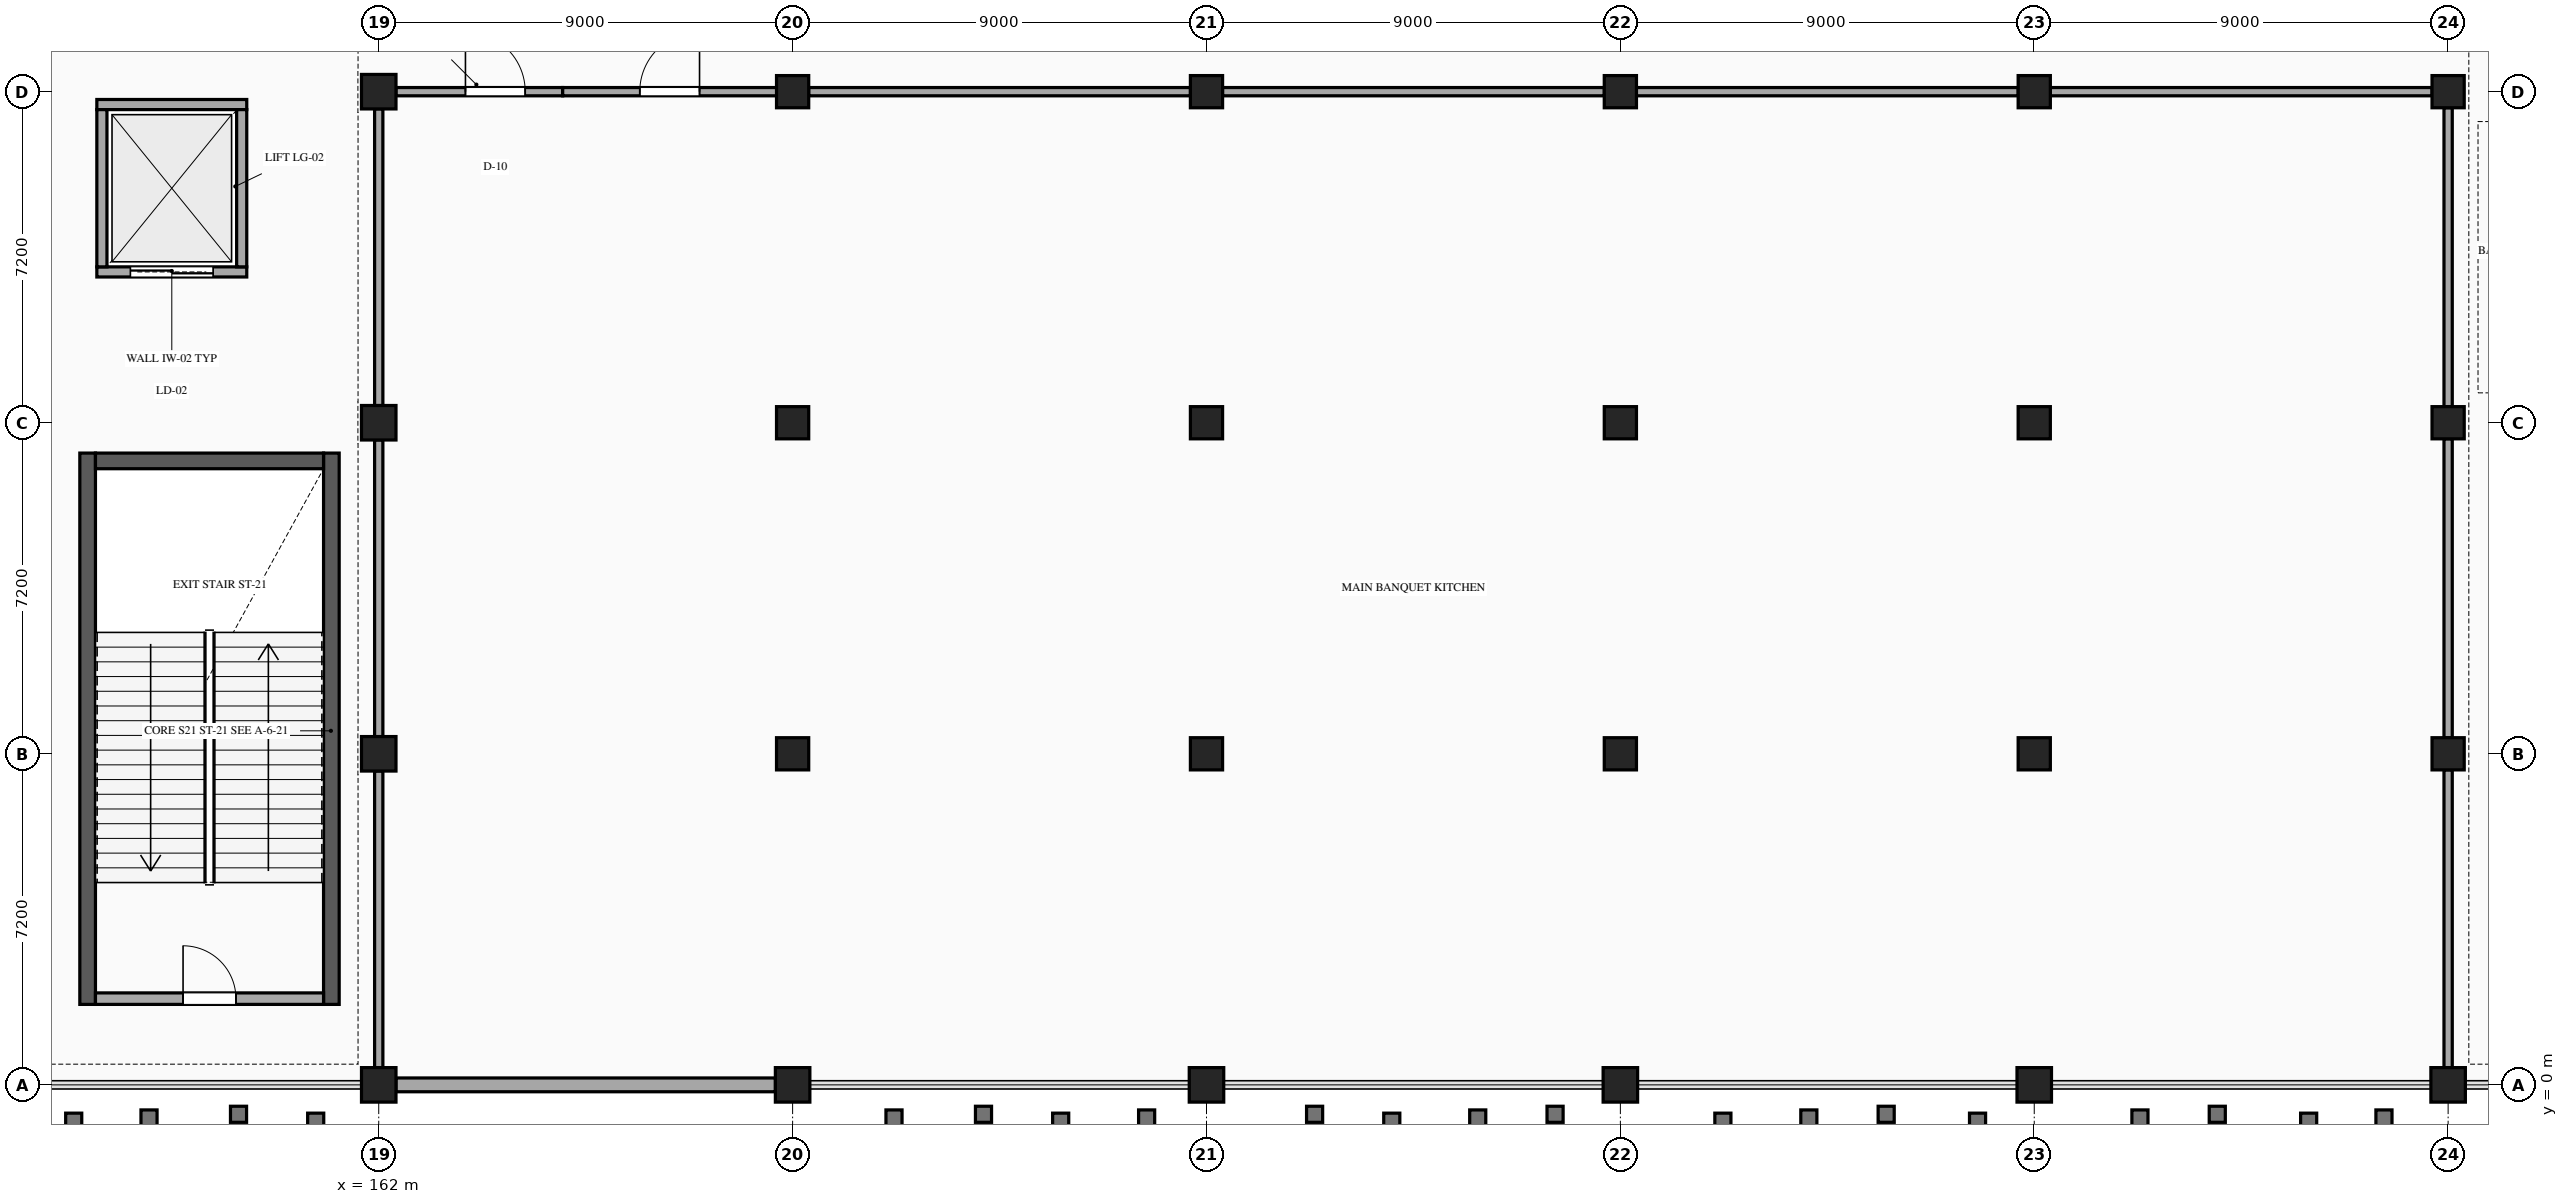
"""IFC4 building model, lengths in metres.
Left out: names, types, materials, properties, quantities, classifications, styles, units other than length and angle.
Written with IfcOpenShell. Run it as: python <this file> out.ifc"""

import sys

from ifc_helpers import new_model, si_unit, direction, frame, frame_2d, origin, origin_2d, place, context, subcontext, project, spatial, rectangle, extrude, element, fill, save


model = new_model("IFC4")
c1 = context("Model", 3, precision=1e-05, world=origin(), true_north=direction((0.0, 1.0)))
c2 = subcontext(c1, "Body", "Model", "MODEL_VIEW")
j1 = project(units=[si_unit("LENGTHUNIT", "METRE"), si_unit("PLANEANGLEUNIT", "RADIAN")], contexts=[c1])
p1 = place(None, origin())
s1 = spatial("IfcSite", under=j1, at=p1, CompositionType="ELEMENT")
p2 = place(p1, origin())
s2 = spatial("IfcBuilding", under=s1, at=p2, CompositionType="ELEMENT")
p3 = place(p2, frame((0.0, 0.0, 5.4)))
s3 = spatial("IfcBuildingStorey", under=s2, at=p3, CompositionType="ELEMENT", Elevation=5.4)
for number, where, z_axis, x_axis in (
    (1, (162.0, 0.0, 0.0), (0.0, 0.0, 1.0), (1.0, 0.0, 0.0)),
    (2, (162.0, 7.2, 0.0), (0.0, 0.0, 1.0), (1.0, 0.0, 0.0)),
    (3, (162.0, 14.4, 0.0), (0.0, 0.0, 1.0), (1.0, 0.0, 0.0)),
    (4, (162.0, 21.6, 0.0), (0.0, 0.0, 1.0), (1.0, 0.0, 0.0)),
    (5, (171.0, 0.0, 0.0), (0.0, 0.0, 1.0), (1.0, 0.0, 0.0)),
):
    element("IfcColumn", number, at=place(p3, frame(where, z_axis=z_axis, x_axis=x_axis)), inside=s3, PredefinedType="COLUMN", context=c2, shape_type="SweptSolid", body=[
        extrude(rectangle(XDim=0.75, YDim=0.75, at=origin_2d()), origin(), (0.0, 0.0, 1.0), 5.4),
    ])
for number, where, z_axis, x_axis in (
    (6, (171.0, 7.2, 0.0), (0.0, 0.0, 1.0), (1.0, 0.0, 0.0)),
    (7, (171.0, 14.4, 0.0), (0.0, 0.0, 1.0), (1.0, 0.0, 0.0)),
    (8, (171.0, 21.6, 0.0), (0.0, 0.0, 1.0), (1.0, 0.0, 0.0)),
):
    element("IfcColumn", number, at=place(p3, frame(where, z_axis=z_axis, x_axis=x_axis)), inside=s3, PredefinedType="COLUMN", context=c2, shape_type="SweptSolid", body=[
        extrude(rectangle(XDim=0.7, YDim=0.7, at=origin_2d()), origin(), (0.0, 0.0, 1.0), 5.4),
    ])
p4 = place(p3, frame((180.0, 0.0, 0.0), z_axis=(0.0, 0.0, 1.0), x_axis=(1.0, 0.0, 0.0)))
e9 = element("IfcColumn", 9, at=p4, inside=s3, PredefinedType="COLUMN", context=c2, shape_type="SweptSolid", body=[
    extrude(rectangle(XDim=0.75, YDim=0.75, at=origin_2d()), origin(), (0.0, 0.0, 1.0), 5.4),
])
for number, where, z_axis, x_axis in (
    (10, (180.0, 7.2, 0.0), (0.0, 0.0, 1.0), (1.0, 0.0, 0.0)),
    (11, (180.0, 14.4, 0.0), (0.0, 0.0, 1.0), (1.0, 0.0, 0.0)),
    (12, (180.0, 21.6, 0.0), (0.0, 0.0, 1.0), (1.0, 0.0, 0.0)),
):
    element("IfcColumn", number, at=place(p3, frame(where, z_axis=z_axis, x_axis=x_axis)), inside=s3, PredefinedType="COLUMN", context=c2, shape_type="SweptSolid", body=[
        extrude(rectangle(XDim=0.7, YDim=0.7, at=origin_2d()), origin(), (0.0, 0.0, 1.0), 5.4),
    ])
p5 = place(p3, frame((189.0, 0.0, 0.0), z_axis=(0.0, 0.0, 1.0), x_axis=(1.0, 0.0, 0.0)))
e13 = element("IfcColumn", 13, at=p5, inside=s3, PredefinedType="COLUMN", context=c2, shape_type="SweptSolid", body=[
    extrude(rectangle(XDim=0.75, YDim=0.75, at=origin_2d()), origin(), (0.0, 0.0, 1.0), 5.4),
])
for number, where, z_axis, x_axis in (
    (14, (189.0, 7.2, 0.0), (0.0, 0.0, 1.0), (1.0, 0.0, 0.0)),
    (15, (189.0, 14.4, 0.0), (0.0, 0.0, 1.0), (1.0, 0.0, 0.0)),
    (16, (189.0, 21.6, 0.0), (0.0, 0.0, 1.0), (1.0, 0.0, 0.0)),
):
    element("IfcColumn", number, at=place(p3, frame(where, z_axis=z_axis, x_axis=x_axis)), inside=s3, PredefinedType="COLUMN", context=c2, shape_type="SweptSolid", body=[
        extrude(rectangle(XDim=0.7, YDim=0.7, at=origin_2d()), origin(), (0.0, 0.0, 1.0), 5.4),
    ])
p6 = place(p3, frame((198.0, 0.0, 0.0), z_axis=(0.0, 0.0, 1.0), x_axis=(1.0, 0.0, 0.0)))
e17 = element("IfcColumn", 17, at=p6, inside=s3, PredefinedType="COLUMN", context=c2, shape_type="SweptSolid", body=[
    extrude(rectangle(XDim=0.75, YDim=0.75, at=origin_2d()), origin(), (0.0, 0.0, 1.0), 5.4),
])
for number, where, z_axis, x_axis in (
    (18, (198.0, 7.2, 0.0), (0.0, 0.0, 1.0), (1.0, 0.0, 0.0)),
    (19, (198.0, 14.4, 0.0), (0.0, 0.0, 1.0), (1.0, 0.0, 0.0)),
    (20, (198.0, 21.6, 0.0), (0.0, 0.0, 1.0), (1.0, 0.0, 0.0)),
):
    element("IfcColumn", number, at=place(p3, frame(where, z_axis=z_axis, x_axis=x_axis)), inside=s3, PredefinedType="COLUMN", context=c2, shape_type="SweptSolid", body=[
        extrude(rectangle(XDim=0.7, YDim=0.7, at=origin_2d()), origin(), (0.0, 0.0, 1.0), 5.4),
    ])
p7 = place(p3, frame((207.0, 0.0, 0.0), z_axis=(0.0, 0.0, 1.0), x_axis=(1.0, 0.0, 0.0)))
e21 = element("IfcColumn", 21, at=p7, inside=s3, PredefinedType="COLUMN", context=c2, shape_type="SweptSolid", body=[
    extrude(rectangle(XDim=0.75, YDim=0.75, at=origin_2d()), origin(), (0.0, 0.0, 1.0), 5.4),
])
for number, where, z_axis, x_axis in (
    (22, (207.0, 7.2, 0.0), (0.0, 0.0, 1.0), (1.0, 0.0, 0.0)),
    (23, (207.0, 14.4, 0.0), (0.0, 0.0, 1.0), (1.0, 0.0, 0.0)),
    (24, (207.0, 21.6, 0.0), (0.0, 0.0, 1.0), (1.0, 0.0, 0.0)),
):
    element("IfcColumn", number, at=place(p3, frame(where, z_axis=z_axis, x_axis=x_axis)), inside=s3, PredefinedType="COLUMN", context=c2, shape_type="SweptSolid", body=[
        extrude(rectangle(XDim=0.7, YDim=0.7, at=origin_2d()), origin(), (0.0, 0.0, 1.0), 5.4),
    ])
for number, where, z_axis, x_axis in (
    (25, (155.67, 1.75, 0.0), (0.0, 0.0, 1.0), (0.0, 1.0, 0.0)),
    (26, (160.97, 13.74, 0.0), (0.0, 0.0, 1.0), (0.0, -1.0, 0.0)),
):
    element("IfcWall", number, at=place(p3, frame(where, z_axis=z_axis, x_axis=x_axis)), inside=s3, PredefinedType="SHEAR", context=c2, shape_type="SweptSolid", body=[
        extrude(rectangle(XDim=11.99, YDim=0.34, at=frame_2d((5.995, 0.0))), origin(), (0.0, 0.0, 1.0), 5.12),
    ])
p8 = place(p3, frame((155.84, 13.57, 0.0), z_axis=(0.0, 0.0, 1.0), x_axis=(1.0, 0.0, 0.0)))
e27 = element("IfcWall", 27, at=p8, inside=s3, PredefinedType="SHEAR", context=c2, shape_type="SweptSolid", body=[
    extrude(rectangle(XDim=4.96, YDim=0.34, at=frame_2d((2.48, 0.0))), origin(), (0.0, 0.0, 1.0), 5.12),
])
p9 = place(p3, frame((170.627, 0.0, 0.0), z_axis=(0.0, 0.0, 1.0), x_axis=(-1.0, 0.0, 0.0)))
e28 = element("IfcWall", 28, at=p9, inside=s3, PredefinedType="STANDARD", context=c2, shape_type="SweptSolid", body=[
    extrude(rectangle(XDim=8.254, YDim=0.3, at=frame_2d((4.127, 0.0))), origin(), (0.0, 0.0, 1.0), 4.764),
])
p10 = place(p3, frame((155.87, 17.68, 0.0), z_axis=(0.0, 0.0, 1.0), x_axis=(1.0, 0.0, 0.0)))
e29 = element("IfcWall", 29, at=p10, inside=s3, PredefinedType="STANDARD", context=c2, shape_type="SweptSolid", body=[
    extrude(rectangle(XDim=3.26, YDim=0.22, at=frame_2d((1.63, 0.0))), origin(), (0.0, 0.0, 1.0), 4.764),
])
p11 = place(p10, frame((0.73, 0.0, 0.0)))
e30 = element("IfcOpeningElement", 30, at=p11, cuts=e29, PredefinedType="OPENING", context=c2, shape_type="SweptSolid", body=[
    extrude(rectangle(XDim=1.8, YDim=2.35, at=frame_2d((0.9, 1.175))), frame((0.0, 0.12, 0.0), z_axis=(0.0, -1.0, 0.0), x_axis=(1.0, 0.0, 0.0)), (0.0, 0.0, 1.0), 0.24),
])
p12 = place(p3, frame((159.13, 21.32, 0.0), z_axis=(0.0, 0.0, 1.0), x_axis=(-1.0, 0.0, 0.0)))
e31 = element("IfcWall", 31, at=p12, inside=s3, PredefinedType="STANDARD", context=c2, shape_type="SweptSolid", body=[
    extrude(rectangle(XDim=3.26, YDim=0.22, at=frame_2d((1.63, 0.0))), origin(), (0.0, 0.0, 1.0), 4.764),
])
for number, where, z_axis, x_axis in (
    (32, (155.98, 21.21, 0.0), (0.0, 0.0, 1.0), (0.0, -1.0, 0.0)),
    (33, (159.02, 17.79, 0.0), (0.0, 0.0, 1.0), (0.0, 1.0, 0.0)),
):
    element("IfcWall", number, at=place(p3, frame(where, z_axis=z_axis, x_axis=x_axis)), inside=s3, PredefinedType="STANDARD", context=c2, shape_type="SweptSolid", body=[
        extrude(rectangle(XDim=3.42, YDim=0.22, at=frame_2d((1.71, 0.0))), origin(), (0.0, 0.0, 1.0), 4.764),
    ])
p13 = place(p3, frame((155.84, 1.875, 0.0), z_axis=(0.0, 0.0, 1.0), x_axis=(1.0, 0.0, 0.0)))
e34 = element("IfcWall", 34, at=p13, inside=s3, PredefinedType="STANDARD", context=c2, shape_type="SweptSolid", body=[
    extrude(rectangle(XDim=4.96, YDim=0.25, at=frame_2d((2.48, 0.0))), origin(), (0.0, 0.0, 1.0), 5.12),
])
p14 = place(p13, frame((1.905, 0.0, 0.0)))
e35 = element("IfcOpeningElement", 35, at=p14, cuts=e34, PredefinedType="OPENING", context=c2, shape_type="SweptSolid", body=[
    extrude(rectangle(XDim=1.15, YDim=2.2, at=frame_2d((0.575, 1.1))), frame((0.0, 0.135, 0.0), z_axis=(0.0, -1.0, 0.0), x_axis=(1.0, 0.0, 0.0)), (0.0, 0.0, 1.0), 0.27),
])
p15 = place(p3, frame((162.373, 21.6, 0.0), z_axis=(0.0, 0.0, 1.0), x_axis=(1.0, 0.0, 0.0)))
e36 = element("IfcWall", 36, at=p15, inside=s3, PredefinedType="PARTITIONING", context=c2, shape_type="SweptSolid", body=[
    extrude(rectangle(XDim=3.627, YDim=0.18, at=frame_2d((1.813, 0.0))), origin(), (0.0, 0.0, 1.0), 4.264),
])
p16 = place(p15, frame((1.513, 0.0, 0.0)))
e37 = element("IfcOpeningElement", 37, at=p16, cuts=e36, PredefinedType="OPENING", context=c2, shape_type="SweptSolid", body=[
    extrude(rectangle(XDim=1.3, YDim=2.2, at=frame_2d((0.65, 1.1))), frame((0.0, 0.1, 0.0), z_axis=(0.0, -1.0, 0.0), x_axis=(1.0, 0.0, 0.0)), (0.0, 0.0, 1.0), 0.2),
])
p17 = place(p3, frame((166.0, 21.6, 0.0), z_axis=(0.0, 0.0, 1.0), x_axis=(1.0, 0.0, 0.0)))
e38 = element("IfcWall", 38, at=p17, inside=s3, PredefinedType="PARTITIONING", context=c2, shape_type="SweptSolid", body=[
    extrude(rectangle(XDim=4.652, YDim=0.18, at=frame_2d((2.326, 0.0))), origin(), (0.0, 0.0, 1.0), 4.264),
])
p18 = place(p17, frame((1.676, 0.0, 0.0)))
e39 = element("IfcOpeningElement", 39, at=p18, cuts=e38, PredefinedType="OPENING", context=c2, shape_type="SweptSolid", body=[
    extrude(rectangle(XDim=1.3, YDim=2.2, at=frame_2d((0.65, 1.1))), frame((0.0, 0.1, 0.0), z_axis=(0.0, -1.0, 0.0), x_axis=(1.0, 0.0, 0.0)), (0.0, 0.0, 1.0), 0.2),
])
for number, where, z_axis, x_axis in (
    (40, (171.348, 21.6, 0.0), (0.0, 0.0, 1.0), (1.0, 0.0, 0.0)),
    (41, (180.348, 21.6, 0.0), (0.0, 0.0, 1.0), (1.0, 0.0, 0.0)),
    (42, (189.348, 21.6, 0.0), (0.0, 0.0, 1.0), (1.0, 0.0, 0.0)),
    (43, (198.348, 21.6, 0.0), (0.0, 0.0, 1.0), (1.0, 0.0, 0.0)),
):
    element("IfcWall", number, at=place(p3, frame(where, z_axis=z_axis, x_axis=x_axis)), inside=s3, PredefinedType="PARTITIONING", context=c2, shape_type="SweptSolid", body=[
        extrude(rectangle(XDim=8.304, YDim=0.18, at=frame_2d((4.152, 0.0))), origin(), (0.0, 0.0, 1.0), 4.264),
    ])
p19 = place(p3, frame((162.0, 0.373, 0.0), z_axis=(0.0, 0.0, 1.0), x_axis=(0.0, 1.0, 0.0)))
e44 = element("IfcWall", 44, at=p19, inside=s3, PredefinedType="PARTITIONING", context=c2, shape_type="SweptSolid", body=[
    extrude(rectangle(XDim=6.454, YDim=0.18, at=frame_2d((3.227, 0.0))), origin(), (0.0, 0.0, 1.0), 4.264),
])
for number, where, z_axis, x_axis in (
    (45, (162.0, 7.573, 0.0), (0.0, 0.0, 1.0), (0.0, 1.0, 0.0)),
    (46, (162.0, 14.773, 0.0), (0.0, 0.0, 1.0), (0.0, 1.0, 0.0)),
):
    element("IfcWall", number, at=place(p3, frame(where, z_axis=z_axis, x_axis=x_axis)), inside=s3, PredefinedType="PARTITIONING", context=c2, shape_type="SweptSolid", body=[
        extrude(rectangle(XDim=6.454, YDim=0.18, at=frame_2d((3.227, 0.0))), origin(), (0.0, 0.0, 1.0), 4.264),
    ])
p20 = place(p3, frame((207.0, 0.373, 0.0), z_axis=(0.0, 0.0, 1.0), x_axis=(0.0, 1.0, 0.0)))
e47 = element("IfcWall", 47, at=p20, inside=s3, PredefinedType="PARTITIONING", context=c2, shape_type="SweptSolid", body=[
    extrude(rectangle(XDim=6.479, YDim=0.18, at=frame_2d((3.24, 0.0))), origin(), (0.0, 0.0, 1.0), 4.264),
])
for number, where, z_axis, x_axis in (
    (48, (207.0, 7.548, 0.0), (0.0, 0.0, 1.0), (0.0, 1.0, 0.0)),
    (49, (207.0, 14.748, 0.0), (0.0, 0.0, 1.0), (0.0, 1.0, 0.0)),
):
    element("IfcWall", number, at=place(p3, frame(where, z_axis=z_axis, x_axis=x_axis)), inside=s3, PredefinedType="PARTITIONING", context=c2, shape_type="SweptSolid", body=[
        extrude(rectangle(XDim=6.504, YDim=0.18, at=frame_2d((3.252, 0.0))), origin(), (0.0, 0.0, 1.0), 4.264),
    ])
p21 = place(p11, origin())
e50 = element("IfcDoor", 50, at=p21, inside=s3, OperationType="DOUBLE_DOOR_SLIDING", PredefinedType="DOOR", context=c2, shape_type="SweptSolid", body=[
    extrude(rectangle(XDim=1.8, YDim=2.35, at=frame_2d((0.9, 1.175))), frame((0.0, 0.025, 0.0), z_axis=(0.0, -1.0, 0.0), x_axis=(1.0, 0.0, 0.0)), (0.0, 0.0, 1.0), 0.05),
])
fill(e30, e50)
p22 = place(p14, origin())
e51 = element("IfcDoor", 51, at=p22, inside=s3, OperationType="SINGLE_SWING_LEFT", PredefinedType="DOOR", context=c2, shape_type="SweptSolid", body=[
    extrude(rectangle(XDim=1.15, YDim=2.2, at=frame_2d((0.575, 1.1))), frame((0.0, 0.025, 0.0), z_axis=(0.0, -1.0, 0.0), x_axis=(1.0, 0.0, 0.0)), (0.0, 0.0, 1.0), 0.05),
])
fill(e35, e51)
p23 = place(p16, origin())
e52 = element("IfcDoor", 52, at=p23, inside=s3, OperationType="SINGLE_SWING_LEFT", PredefinedType="DOOR", context=c2, shape_type="SweptSolid", body=[
    extrude(rectangle(XDim=1.3, YDim=2.2, at=frame_2d((0.65, 1.1))), frame((0.0, 0.025, 0.0), z_axis=(0.0, -1.0, 0.0), x_axis=(1.0, 0.0, 0.0)), (0.0, 0.0, 1.0), 0.05),
])
fill(e37, e52)
p24 = place(p18, origin())
e53 = element("IfcDoor", 53, at=p24, inside=s3, OperationType="SINGLE_SWING_RIGHT", PredefinedType="DOOR", context=c2, shape_type="SweptSolid", body=[
    extrude(rectangle(XDim=1.3, YDim=2.2, at=frame_2d((0.65, 1.1))), frame((0.0, 0.025, 0.0), z_axis=(0.0, -1.0, 0.0), x_axis=(1.0, 0.0, 0.0)), (0.0, 0.0, 1.0), 0.05),
])
fill(e39, e53)
save(model, sys.argv[1])
